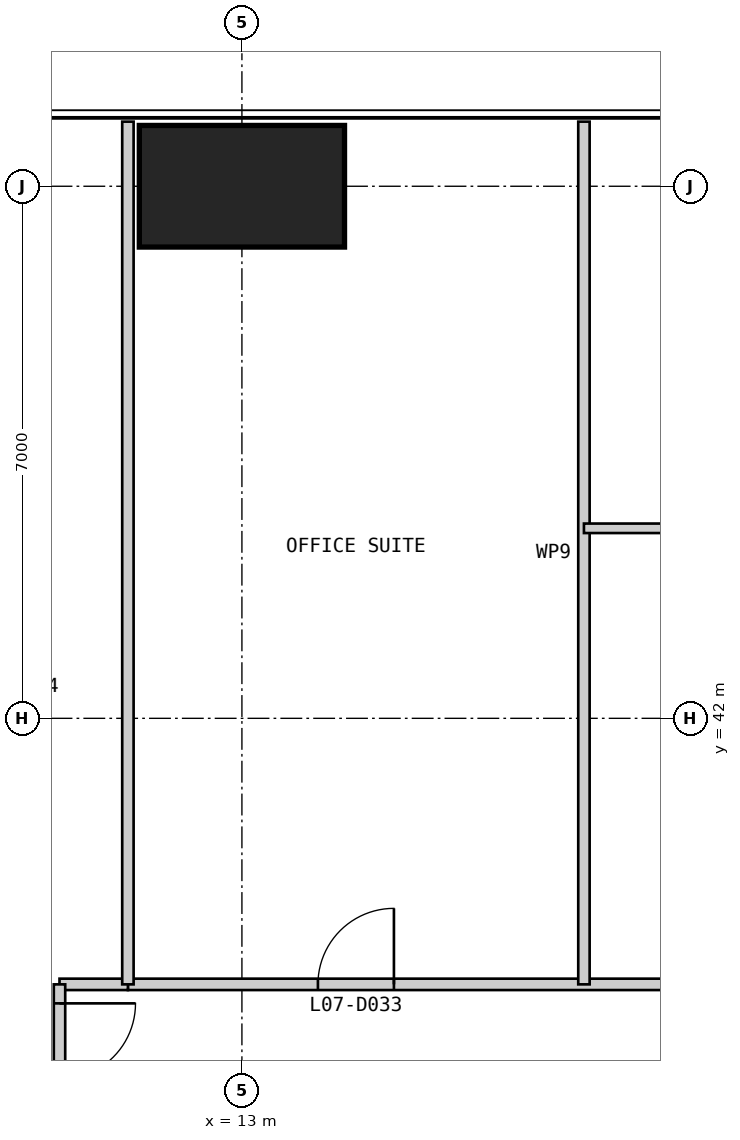
"""IFC4 building model, lengths in metres.
Left out: names, types, materials, properties, quantities, classifications, styles, units other than length and angle.
Written with IfcOpenShell. Run it as: python <this file> out.ifc"""

import sys

from ifc_helpers import new_model, si_unit, direction, frame, frame_2d, origin, origin_2d, place, context, subcontext, project, spatial, rectangle, extrude, element, fill, save


model = new_model("IFC4")
c1 = context("Model", 3, precision=1e-05, world=origin(), true_north=direction((0.0, 1.0)))
c2 = subcontext(c1, "Body", "Model", "MODEL_VIEW")
j1 = project(units=[si_unit("LENGTHUNIT", "METRE"), si_unit("PLANEANGLEUNIT", "RADIAN")], contexts=[c1])
p1 = place(None, origin())
s1 = spatial("IfcSite", under=j1, at=p1, CompositionType="ELEMENT")
p2 = place(p1, origin())
s2 = spatial("IfcBuilding", under=s1, at=p2, CompositionType="ELEMENT")
p3 = place(p2, frame((0.0, 0.0, 35.0)))
s3 = spatial("IfcBuildingStorey", under=s2, at=p3, CompositionType="ELEMENT", Elevation=35.0)
p4 = place(p3, frame((13.0, 49.0, 0.0), z_axis=(0.0, 0.0, 1.0), x_axis=(1.0, 0.0, 0.0)))
e1 = element("IfcColumn", 1, at=p4, inside=s3, PredefinedType="COLUMN", context=c2, shape_type="SweptSolid", body=[
    extrude(rectangle(XDim=2.7, YDim=1.6, at=origin_2d()), origin(), (0.0, 0.0, 1.0), 4.0),
])
p5 = place(p3, frame((38.5, 38.5, 0.0), z_axis=(0.0, 0.0, 1.0), x_axis=(-1.0, 0.0, 0.0)))
e2 = element("IfcWall", 2, at=p5, inside=s3, PredefinedType="PARTITIONING", context=c2, shape_type="SweptSolid", body=[
    extrude(rectangle(XDim=27.0, YDim=0.15, at=frame_2d((13.5, 0.0))), origin(), (0.0, 0.0, 1.0), 3.85),
])
p6 = place(p5, frame((2.5, 0.0, 0.0)))
e3 = element("IfcOpeningElement", 3, at=p6, cuts=e2, PredefinedType="OPENING", context=c2, shape_type="SweptSolid", body=[
    extrude(rectangle(XDim=1.0, YDim=2.2, at=frame_2d((0.5, 1.1))), frame((0.0, 0.085, 0.0), z_axis=(0.0, -1.0, 0.0), x_axis=(1.0, 0.0, 0.0)), (0.0, 0.0, 1.0), 0.17),
])
p7 = place(p5, frame((13.0, 0.0, 0.0)))
e4 = element("IfcOpeningElement", 4, at=p7, cuts=e2, PredefinedType="OPENING", context=c2, shape_type="SweptSolid", body=[
    extrude(rectangle(XDim=1.0, YDim=2.2, at=frame_2d((0.5, 1.1))), frame((0.0, 0.085, 0.0), z_axis=(0.0, -1.0, 0.0), x_axis=(1.0, 0.0, 0.0)), (0.0, 0.0, 1.0), 0.17),
])
p8 = place(p5, frame((23.5, 0.0, 0.0)))
e5 = element("IfcOpeningElement", 5, at=p8, cuts=e2, PredefinedType="OPENING", context=c2, shape_type="SweptSolid", body=[
    extrude(rectangle(XDim=1.0, YDim=2.2, at=frame_2d((0.5, 1.1))), frame((0.0, 0.085, 0.0), z_axis=(0.0, -1.0, 0.0), x_axis=(1.0, 0.0, 0.0)), (0.0, 0.0, 1.0), 0.17),
])
p9 = place(p3, frame((17.5, 49.85, 0.0), z_axis=(0.0, 0.0, 1.0), x_axis=(0.0, -1.0, 0.0)))
e6 = element("IfcWall", 6, at=p9, inside=s3, PredefinedType="PARTITIONING", context=c2, shape_type="SweptSolid", body=[
    extrude(rectangle(XDim=11.35, YDim=0.15, at=frame_2d((5.675, 0.0))), origin(), (0.0, 0.0, 1.0), 3.85),
])
p10 = place(p3, frame((20.5, 44.5, 0.0), z_axis=(0.0, 0.0, 1.0), x_axis=(-1.0, 0.0, 0.0)))
e7 = element("IfcWall", 7, at=p10, inside=s3, PredefinedType="PARTITIONING", context=c2, shape_type="SweptSolid", body=[
    extrude(rectangle(XDim=3.0, YDim=0.125, at=frame_2d((1.5, 0.0))), origin(), (0.0, 0.0, 1.0), 3.85),
])
p11 = place(p3, frame((11.5, 38.5, 0.0), z_axis=(0.0, 0.0, 1.0), x_axis=(-1.0, 0.0, 0.0)))
e8 = element("IfcWall", 8, at=p11, inside=s3, PredefinedType="PARTITIONING", context=c2, shape_type="SweptSolid", body=[
    extrude(rectangle(XDim=0.9, YDim=0.15, at=frame_2d((0.45, 0.0))), origin(), (0.0, 0.0, 1.0), 3.85),
])
p12 = place(p3, frame((10.6, 38.5, 0.0), z_axis=(0.0, 0.0, 1.0), x_axis=(0.0, -1.0, 0.0)))
e9 = element("IfcWall", 9, at=p12, inside=s3, PredefinedType="PARTITIONING", context=c2, shape_type="SweptSolid", body=[
    extrude(rectangle(XDim=27.0, YDim=0.15, at=frame_2d((13.5, 0.0))), origin(), (0.0, 0.0, 1.0), 3.85),
])
p13 = place(p12, frame((0.25, 0.0, 0.0)))
e10 = element("IfcOpeningElement", 10, at=p13, cuts=e9, PredefinedType="OPENING", context=c2, shape_type="SweptSolid", body=[
    extrude(rectangle(XDim=1.0, YDim=2.2, at=frame_2d((0.5, 1.1))), frame((0.0, 0.085, 0.0), z_axis=(0.0, -1.0, 0.0), x_axis=(1.0, 0.0, 0.0)), (0.0, 0.0, 1.0), 0.17),
])
p14 = place(p12, frame((22.75, 0.0, 0.0)))
e11 = element("IfcOpeningElement", 11, at=p14, cuts=e9, PredefinedType="OPENING", context=c2, shape_type="SweptSolid", body=[
    extrude(rectangle(XDim=1.0, YDim=2.2, at=frame_2d((0.5, 1.1))), frame((0.0, 0.085, 0.0), z_axis=(0.0, -1.0, 0.0), x_axis=(1.0, 0.0, 0.0)), (0.0, 0.0, 1.0), 0.17),
])
p15 = place(p3, frame((11.5, 49.85, 0.0), z_axis=(0.0, 0.0, 1.0), x_axis=(0.0, -1.0, 0.0)))
e12 = element("IfcWall", 12, at=p15, inside=s3, PredefinedType="PARTITIONING", context=c2, shape_type="SweptSolid", body=[
    extrude(rectangle(XDim=11.35, YDim=0.15, at=frame_2d((5.675, 0.0))), origin(), (0.0, 0.0, 1.0), 3.85),
])
p16 = place(p8, frame((1.0, 0.0, 0.0), z_axis=(0.0, 0.0, 1.0), x_axis=(-1.0, 0.0, 0.0)))
e13 = element("IfcDoor", 13, at=p16, inside=s3, OperationType="SINGLE_SWING_RIGHT", PredefinedType="DOOR", context=c2, shape_type="SweptSolid", body=[
    extrude(rectangle(XDim=1.0, YDim=2.2, at=frame_2d((0.5, 1.1))), frame((0.0, 0.025, 0.0), z_axis=(0.0, -1.0, 0.0), x_axis=(1.0, 0.0, 0.0)), (0.0, 0.0, 1.0), 0.05),
])
fill(e5, e13)
p17 = place(p13, origin())
e14 = element("IfcDoor", 14, at=p17, inside=s3, OperationType="SINGLE_SWING_LEFT", PredefinedType="DOOR", context=c2, shape_type="SweptSolid", body=[
    extrude(rectangle(XDim=1.0, YDim=2.2, at=frame_2d((0.5, 1.1))), frame((0.0, 0.025, 0.0), z_axis=(0.0, -1.0, 0.0), x_axis=(1.0, 0.0, 0.0)), (0.0, 0.0, 1.0), 0.05),
])
fill(e10, e14)
save(model, sys.argv[1])
